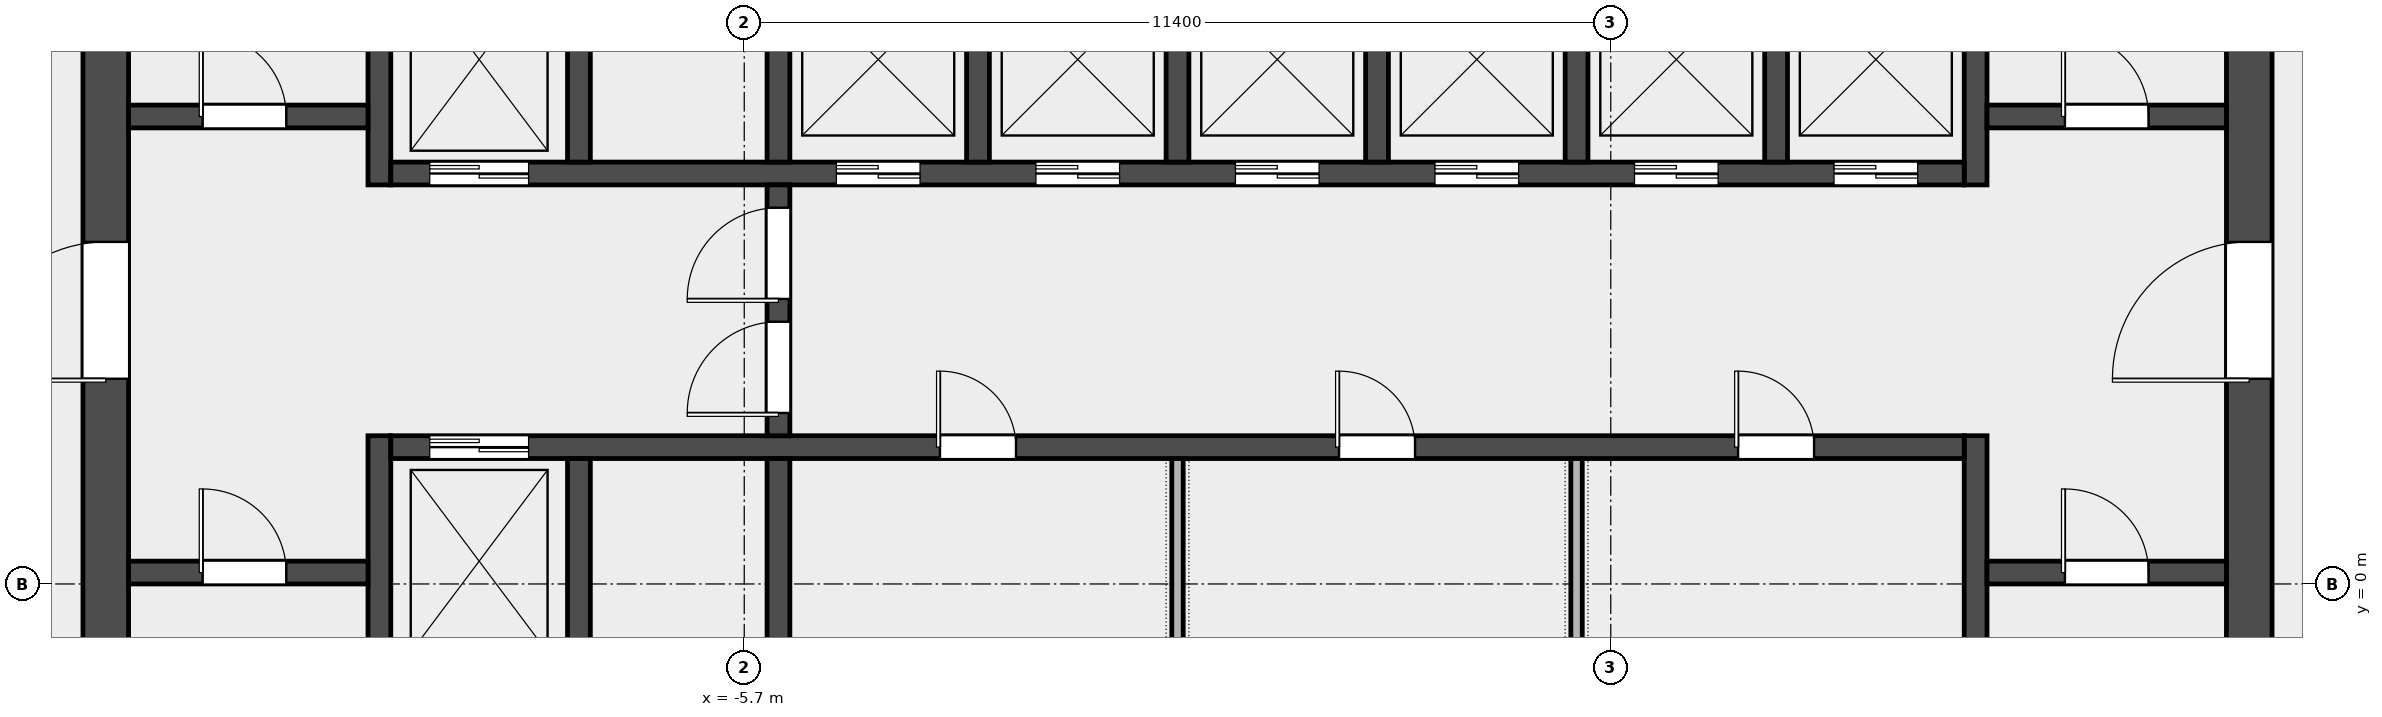
"""IFC4 building model, lengths in metres.
Left out: names, types, materials, properties, quantities, classifications, styles, units other than length and angle.
Written with IfcOpenShell. Run it as: python <this file> out.ifc"""

import sys

from ifc_helpers import new_model, si_unit, direction, frame, frame_2d, origin, place, context, subcontext, project, spatial, rectangle, extrude, element, fill, save


model = new_model("IFC4")
c1 = context("Model", 3, precision=1e-05, world=origin(), true_north=direction((0.0, 1.0)))
c2 = subcontext(c1, "Body", "Model", "MODEL_VIEW")
j1 = project(units=[si_unit("LENGTHUNIT", "METRE"), si_unit("PLANEANGLEUNIT", "RADIAN")], contexts=[c1])
p1 = place(None, origin())
s1 = spatial("IfcSite", under=j1, at=p1, CompositionType="ELEMENT")
p2 = place(p1, origin())
s2 = spatial("IfcBuilding", under=s1, at=p2, CompositionType="ELEMENT")
p3 = place(p2, frame((0.0, 0.0, 267.4)))
s3 = spatial("IfcBuildingStorey", under=s2, at=p3, CompositionType="ELEMENT", Elevation=267.4)
p4 = place(p3, frame((-14.1, -6.6, 0.0), z_axis=(0.0, 0.0, 1.0), x_axis=(0.0, 1.0, 0.0)))
e1 = element("IfcWall", 1, at=p4, inside=s3, PredefinedType="SHEAR", context=c2, shape_type="SweptSolid", body=[
    extrude(rectangle(XDim=19.5, YDim=0.6, at=frame_2d((9.75, 0.0))), origin(), (0.0, 0.0, 1.0), 3.7),
])
p5 = place(p4, frame((9.3, 0.0, 0.0)))
e2 = element("IfcOpeningElement", 2, at=p5, cuts=e1, PredefinedType="OPENING", context=c2, shape_type="SweptSolid", body=[
    extrude(rectangle(XDim=1.8, YDim=2.1, at=frame_2d((0.9, 1.05))), frame((0.0, 0.312, 0.0), z_axis=(0.0, -1.0, 0.0), x_axis=(1.0, 0.0, 0.0)), (0.0, 0.0, 1.0), 0.624),
])
p6 = place(p3, frame((14.1, -6.6, 0.0), z_axis=(0.0, 0.0, 1.0), x_axis=(0.0, 1.0, 0.0)))
e3 = element("IfcWall", 3, at=p6, inside=s3, PredefinedType="SHEAR", context=c2, shape_type="SweptSolid", body=[
    extrude(rectangle(XDim=19.5, YDim=0.6, at=frame_2d((9.75, 0.0))), origin(), (0.0, 0.0, 1.0), 3.7),
])
p7 = place(p6, frame((9.3, 0.0, 0.0)))
e4 = element("IfcOpeningElement", 4, at=p7, cuts=e3, PredefinedType="OPENING", context=c2, shape_type="SweptSolid", body=[
    extrude(rectangle(XDim=1.8, YDim=2.1, at=frame_2d((0.9, 1.05))), frame((0.0, 0.312, 0.0), z_axis=(0.0, -1.0, 0.0), x_axis=(1.0, 0.0, 0.0)), (0.0, 0.0, 1.0), 0.624),
])
p8 = place(p3, frame((-10.5, -6.6, 0.0), z_axis=(0.0, 0.0, 1.0), x_axis=(0.0, 1.0, 0.0)))
e5 = element("IfcWall", 5, at=p8, inside=s3, PredefinedType="SHEAR", context=c2, shape_type="SweptSolid", body=[
    extrude(rectangle(XDim=8.55, YDim=0.3, at=frame_2d((4.275, 0.0))), origin(), (0.0, 0.0, 1.0), 3.7),
])
p9 = place(p3, frame((-10.5, 5.25, 0.0), z_axis=(0.0, 0.0, 1.0), x_axis=(0.0, 1.0, 0.0)))
e6 = element("IfcWall", 6, at=p9, inside=s3, PredefinedType="SHEAR", context=c2, shape_type="SweptSolid", body=[
    extrude(rectangle(XDim=7.65, YDim=0.3, at=frame_2d((3.825, 0.0))), origin(), (0.0, 0.0, 1.0), 3.7),
])
p10 = place(p3, frame((10.5, -6.6, 0.0), z_axis=(0.0, 0.0, 1.0), x_axis=(0.0, 1.0, 0.0)))
e7 = element("IfcWall", 7, at=p10, inside=s3, PredefinedType="SHEAR", context=c2, shape_type="SweptSolid", body=[
    extrude(rectangle(XDim=8.55, YDim=0.3, at=frame_2d((4.275, 0.0))), origin(), (0.0, 0.0, 1.0), 3.7),
])
p11 = place(p3, frame((10.5, 5.25, 0.0), z_axis=(0.0, 0.0, 1.0), x_axis=(0.0, 1.0, 0.0)))
e8 = element("IfcWall", 8, at=p11, inside=s3, PredefinedType="SHEAR", context=c2, shape_type="SweptSolid", body=[
    extrude(rectangle(XDim=7.65, YDim=0.3, at=frame_2d((3.825, 0.0))), origin(), (0.0, 0.0, 1.0), 3.7),
])
p12 = place(p3, frame((-13.8, 0.15, 0.0), z_axis=(0.0, 0.0, 1.0), x_axis=(1.0, 0.0, 0.0)))
e9 = element("IfcWall", 9, at=p12, inside=s3, PredefinedType="SOLIDWALL", context=c2, shape_type="SweptSolid", body=[
    extrude(rectangle(XDim=3.15, YDim=0.3, at=frame_2d((1.575, 0.0))), origin(), (0.0, 0.0, 1.0), 3.7),
])
p13 = place(p12, frame((0.975, 0.0, 0.0)))
e10 = element("IfcOpeningElement", 10, at=p13, cuts=e9, PredefinedType="OPENING", context=c2, shape_type="SweptSolid", body=[
    extrude(rectangle(XDim=1.1, YDim=2.1, at=frame_2d((0.55, 1.05))), frame((0.0, 0.162, 0.0), z_axis=(0.0, -1.0, 0.0), x_axis=(1.0, 0.0, 0.0)), (0.0, 0.0, 1.0), 0.324),
])
p14 = place(p3, frame((-13.8, 6.15, 0.0), z_axis=(0.0, 0.0, 1.0), x_axis=(1.0, 0.0, 0.0)))
e11 = element("IfcWall", 11, at=p14, inside=s3, PredefinedType="SOLIDWALL", context=c2, shape_type="SweptSolid", body=[
    extrude(rectangle(XDim=3.15, YDim=0.3, at=frame_2d((1.575, 0.0))), origin(), (0.0, 0.0, 1.0), 3.7),
])
p15 = place(p14, frame((0.975, 0.0, 0.0)))
e12 = element("IfcOpeningElement", 12, at=p15, cuts=e11, PredefinedType="OPENING", context=c2, shape_type="SweptSolid", body=[
    extrude(rectangle(XDim=1.1, YDim=2.1, at=frame_2d((0.55, 1.05))), frame((0.0, 0.162, 0.0), z_axis=(0.0, -1.0, 0.0), x_axis=(1.0, 0.0, 0.0)), (0.0, 0.0, 1.0), 0.324),
])
p16 = place(p3, frame((10.65, 0.15, 0.0), z_axis=(0.0, 0.0, 1.0), x_axis=(1.0, 0.0, 0.0)))
e13 = element("IfcWall", 13, at=p16, inside=s3, PredefinedType="SOLIDWALL", context=c2, shape_type="SweptSolid", body=[
    extrude(rectangle(XDim=3.15, YDim=0.3, at=frame_2d((1.575, 0.0))), origin(), (0.0, 0.0, 1.0), 3.7),
])
p17 = place(p16, frame((1.025, 0.0, 0.0)))
e14 = element("IfcOpeningElement", 14, at=p17, cuts=e13, PredefinedType="OPENING", context=c2, shape_type="SweptSolid", body=[
    extrude(rectangle(XDim=1.1, YDim=2.1, at=frame_2d((0.55, 1.05))), frame((0.0, 0.162, 0.0), z_axis=(0.0, -1.0, 0.0), x_axis=(1.0, 0.0, 0.0)), (0.0, 0.0, 1.0), 0.324),
])
p18 = place(p3, frame((10.65, 6.15, 0.0), z_axis=(0.0, 0.0, 1.0), x_axis=(1.0, 0.0, 0.0)))
e15 = element("IfcWall", 15, at=p18, inside=s3, PredefinedType="SOLIDWALL", context=c2, shape_type="SweptSolid", body=[
    extrude(rectangle(XDim=3.15, YDim=0.3, at=frame_2d((1.575, 0.0))), origin(), (0.0, 0.0, 1.0), 3.7),
])
p19 = place(p18, frame((1.025, 0.0, 0.0)))
e16 = element("IfcOpeningElement", 16, at=p19, cuts=e15, PredefinedType="OPENING", context=c2, shape_type="SweptSolid", body=[
    extrude(rectangle(XDim=1.1, YDim=2.1, at=frame_2d((0.55, 1.05))), frame((0.0, 0.162, 0.0), z_axis=(0.0, -1.0, 0.0), x_axis=(1.0, 0.0, 0.0)), (0.0, 0.0, 1.0), 0.324),
])
p20 = place(p3, frame((-10.35, 1.8, 0.0), z_axis=(0.0, 0.0, 1.0), x_axis=(1.0, 0.0, 0.0)))
e17 = element("IfcWall", 17, at=p20, inside=s3, PredefinedType="SOLIDWALL", context=c2, shape_type="SweptSolid", body=[
    extrude(rectangle(XDim=20.7, YDim=0.3, at=frame_2d((10.35, 0.0))), origin(), (0.0, 0.0, 1.0), 3.7),
])
p21 = place(p20, frame((0.512, 0.0, 0.0)))
e18 = element("IfcOpeningElement", 18, at=p21, cuts=e17, PredefinedType="OPENING", context=c2, shape_type="SweptSolid", body=[
    extrude(rectangle(XDim=1.3, YDim=2.1, at=frame_2d((0.65, 1.05))), frame((0.0, 0.162, 0.0), z_axis=(0.0, -1.0, 0.0), x_axis=(1.0, 0.0, 0.0)), (0.0, 0.0, 1.0), 0.324),
])
p22 = place(p20, frame((7.225, 0.0, 0.0)))
e19 = element("IfcOpeningElement", 19, at=p22, cuts=e17, PredefinedType="OPENING", context=c2, shape_type="SweptSolid", body=[
    extrude(rectangle(XDim=1.0, YDim=2.1, at=frame_2d((0.5, 1.05))), frame((0.0, 0.162, 0.0), z_axis=(0.0, -1.0, 0.0), x_axis=(1.0, 0.0, 0.0)), (0.0, 0.0, 1.0), 0.324),
])
p23 = place(p20, frame((12.475, 0.0, 0.0)))
e20 = element("IfcOpeningElement", 20, at=p23, cuts=e17, PredefinedType="OPENING", context=c2, shape_type="SweptSolid", body=[
    extrude(rectangle(XDim=1.0, YDim=2.1, at=frame_2d((0.5, 1.05))), frame((0.0, 0.162, 0.0), z_axis=(0.0, -1.0, 0.0), x_axis=(1.0, 0.0, 0.0)), (0.0, 0.0, 1.0), 0.324),
])
p24 = place(p20, frame((17.725, 0.0, 0.0)))
e21 = element("IfcOpeningElement", 21, at=p24, cuts=e17, PredefinedType="OPENING", context=c2, shape_type="SweptSolid", body=[
    extrude(rectangle(XDim=1.0, YDim=2.1, at=frame_2d((0.5, 1.05))), frame((0.0, 0.162, 0.0), z_axis=(0.0, -1.0, 0.0), x_axis=(1.0, 0.0, 0.0)), (0.0, 0.0, 1.0), 0.324),
])
p25 = place(p3, frame((-10.35, 5.4, 0.0), z_axis=(0.0, 0.0, 1.0), x_axis=(1.0, 0.0, 0.0)))
e22 = element("IfcWall", 22, at=p25, inside=s3, PredefinedType="SOLIDWALL", context=c2, shape_type="SweptSolid", body=[
    extrude(rectangle(XDim=20.7, YDim=0.3, at=frame_2d((10.35, 0.0))), origin(), (0.0, 0.0, 1.0), 3.7),
])
p26 = place(p25, frame((0.512, 0.0, 0.0)))
e23 = element("IfcOpeningElement", 23, at=p26, cuts=e22, PredefinedType="OPENING", context=c2, shape_type="SweptSolid", body=[
    extrude(rectangle(XDim=1.3, YDim=2.1, at=frame_2d((0.65, 1.05))), frame((0.0, 0.162, 0.0), z_axis=(0.0, -1.0, 0.0), x_axis=(1.0, 0.0, 0.0)), (0.0, 0.0, 1.0), 0.324),
])
p27 = place(p25, frame((5.863, 0.0, 0.0)))
e24 = element("IfcOpeningElement", 24, at=p27, cuts=e22, PredefinedType="OPENING", context=c2, shape_type="SweptSolid", body=[
    extrude(rectangle(XDim=1.1, YDim=2.1, at=frame_2d((0.55, 1.05))), frame((0.0, 0.162, 0.0), z_axis=(0.0, -1.0, 0.0), x_axis=(1.0, 0.0, 0.0)), (0.0, 0.0, 1.0), 0.324),
])
p28 = place(p25, frame((8.488, 0.0, 0.0)))
e25 = element("IfcOpeningElement", 25, at=p28, cuts=e22, PredefinedType="OPENING", context=c2, shape_type="SweptSolid", body=[
    extrude(rectangle(XDim=1.1, YDim=2.1, at=frame_2d((0.55, 1.05))), frame((0.0, 0.162, 0.0), z_axis=(0.0, -1.0, 0.0), x_axis=(1.0, 0.0, 0.0)), (0.0, 0.0, 1.0), 0.324),
])
p29 = place(p25, frame((11.113, 0.0, 0.0)))
e26 = element("IfcOpeningElement", 26, at=p29, cuts=e22, PredefinedType="OPENING", context=c2, shape_type="SweptSolid", body=[
    extrude(rectangle(XDim=1.1, YDim=2.1, at=frame_2d((0.55, 1.05))), frame((0.0, 0.162, 0.0), z_axis=(0.0, -1.0, 0.0), x_axis=(1.0, 0.0, 0.0)), (0.0, 0.0, 1.0), 0.324),
])
p30 = place(p25, frame((13.738, 0.0, 0.0)))
e27 = element("IfcOpeningElement", 27, at=p30, cuts=e22, PredefinedType="OPENING", context=c2, shape_type="SweptSolid", body=[
    extrude(rectangle(XDim=1.1, YDim=2.1, at=frame_2d((0.55, 1.05))), frame((0.0, 0.162, 0.0), z_axis=(0.0, -1.0, 0.0), x_axis=(1.0, 0.0, 0.0)), (0.0, 0.0, 1.0), 0.324),
])
p31 = place(p25, frame((16.363, 0.0, 0.0)))
e28 = element("IfcOpeningElement", 28, at=p31, cuts=e22, PredefinedType="OPENING", context=c2, shape_type="SweptSolid", body=[
    extrude(rectangle(XDim=1.1, YDim=2.1, at=frame_2d((0.55, 1.05))), frame((0.0, 0.162, 0.0), z_axis=(0.0, -1.0, 0.0), x_axis=(1.0, 0.0, 0.0)), (0.0, 0.0, 1.0), 0.324),
])
p32 = place(p25, frame((18.988, 0.0, 0.0)))
e29 = element("IfcOpeningElement", 29, at=p32, cuts=e22, PredefinedType="OPENING", context=c2, shape_type="SweptSolid", body=[
    extrude(rectangle(XDim=1.1, YDim=2.1, at=frame_2d((0.55, 1.05))), frame((0.0, 0.162, 0.0), z_axis=(0.0, -1.0, 0.0), x_axis=(1.0, 0.0, 0.0)), (0.0, 0.0, 1.0), 0.324),
])
for number, where, z_axis, x_axis in (
    (30, (-7.875, -1.05, 0.0), (0.0, 0.0, 1.0), (0.0, 1.0, 0.0)),
    (31, (-5.25, -1.05, 0.0), (0.0, 0.0, 1.0), (0.0, 1.0, 0.0)),
    (32, (-7.875, 5.55, 0.0), (0.0, 0.0, 1.0), (0.0, 1.0, 0.0)),
    (33, (-5.25, 5.55, 0.0), (0.0, 0.0, 1.0), (0.0, 1.0, 0.0)),
    (34, (-2.625, 5.55, 0.0), (0.0, 0.0, 1.0), (0.0, 1.0, 0.0)),
    (35, (0.0, 5.55, 0.0), (0.0, 0.0, 1.0), (0.0, 1.0, 0.0)),
    (36, (2.625, 5.55, 0.0), (0.0, 0.0, 1.0), (0.0, 1.0, 0.0)),
    (37, (5.25, 5.55, 0.0), (0.0, 0.0, 1.0), (0.0, 1.0, 0.0)),
    (38, (7.875, 5.55, 0.0), (0.0, 0.0, 1.0), (0.0, 1.0, 0.0)),
):
    element("IfcWall", number, at=place(p3, frame(where, z_axis=z_axis, x_axis=x_axis)), inside=s3, PredefinedType="SOLIDWALL", context=c2, shape_type="SweptSolid", body=[
        extrude(rectangle(XDim=2.7, YDim=0.3, at=frame_2d((1.35, 0.0))), origin(), (0.0, 0.0, 1.0), 3.7),
    ])
p33 = place(p3, frame((-5.25, 1.95, 0.0), z_axis=(0.0, 0.0, 1.0), x_axis=(0.0, 1.0, 0.0)))
e39 = element("IfcWall", 39, at=p33, inside=s3, PredefinedType="SOLIDWALL", context=c2, shape_type="SweptSolid", body=[
    extrude(rectangle(XDim=3.3, YDim=0.3, at=frame_2d((1.65, 0.0))), origin(), (0.0, 0.0, 1.0), 3.7),
])
p34 = place(p33, frame((0.3, 0.0, 0.0)))
e40 = element("IfcOpeningElement", 40, at=p34, cuts=e39, PredefinedType="OPENING", context=c2, shape_type="SweptSolid", body=[
    extrude(rectangle(XDim=1.2, YDim=2.1, at=frame_2d((0.6, 1.05))), frame((0.0, 0.162, 0.0), z_axis=(0.0, -1.0, 0.0), x_axis=(1.0, 0.0, 0.0)), (0.0, 0.0, 1.0), 0.324),
])
p35 = place(p33, frame((1.8, 0.0, 0.0)))
e41 = element("IfcOpeningElement", 41, at=p35, cuts=e39, PredefinedType="OPENING", context=c2, shape_type="SweptSolid", body=[
    extrude(rectangle(XDim=1.2, YDim=2.1, at=frame_2d((0.6, 1.05))), frame((0.0, 0.162, 0.0), z_axis=(0.0, -1.0, 0.0), x_axis=(1.0, 0.0, 0.0)), (0.0, 0.0, 1.0), 0.324),
])
for number, where, z_axis, x_axis in (
    (42, (0.0, -1.05, 0.0), (0.0, 0.0, 1.0), (0.0, 1.0, 0.0)),
    (43, (5.25, -1.05, 0.0), (0.0, 0.0, 1.0), (0.0, 1.0, 0.0)),
):
    element("IfcWall", number, at=place(p3, frame(where, z_axis=z_axis, x_axis=x_axis)), inside=s3, PredefinedType="PARTITIONING", context=c2, shape_type="SweptSolid", body=[
        extrude(rectangle(XDim=2.7, YDim=0.15, at=frame_2d((1.35, 0.0))), origin(), (0.0, 0.0, 1.0), 3.7),
    ])
p36 = place(p13, origin())
e44 = element("IfcDoor", 44, at=p36, inside=s3, OperationType="SINGLE_SWING_LEFT", PredefinedType="DOOR", context=c2, shape_type="SweptSolid", body=[
    extrude(rectangle(XDim=1.1, YDim=2.1, at=frame_2d((0.55, 1.05))), frame((0.0, 0.025, 0.0), z_axis=(0.0, -1.0, 0.0), x_axis=(1.0, 0.0, 0.0)), (0.0, 0.0, 1.0), 0.05),
])
fill(e10, e44)
p37 = place(p15, origin())
e45 = element("IfcDoor", 45, at=p37, inside=s3, OperationType="SINGLE_SWING_LEFT", PredefinedType="DOOR", context=c2, shape_type="SweptSolid", body=[
    extrude(rectangle(XDim=1.1, YDim=2.1, at=frame_2d((0.55, 1.05))), frame((0.0, 0.025, 0.0), z_axis=(0.0, -1.0, 0.0), x_axis=(1.0, 0.0, 0.0)), (0.0, 0.0, 1.0), 0.05),
])
fill(e12, e45)
p38 = place(p17, origin())
e46 = element("IfcDoor", 46, at=p38, inside=s3, OperationType="SINGLE_SWING_RIGHT", PredefinedType="DOOR", context=c2, shape_type="SweptSolid", body=[
    extrude(rectangle(XDim=1.1, YDim=2.1, at=frame_2d((0.55, 1.05))), frame((0.0, 0.025, 0.0), z_axis=(0.0, -1.0, 0.0), x_axis=(1.0, 0.0, 0.0)), (0.0, 0.0, 1.0), 0.05),
])
fill(e14, e46)
p39 = place(p19, origin())
e47 = element("IfcDoor", 47, at=p39, inside=s3, OperationType="SINGLE_SWING_RIGHT", PredefinedType="DOOR", context=c2, shape_type="SweptSolid", body=[
    extrude(rectangle(XDim=1.1, YDim=2.1, at=frame_2d((0.55, 1.05))), frame((0.0, 0.025, 0.0), z_axis=(0.0, -1.0, 0.0), x_axis=(1.0, 0.0, 0.0)), (0.0, 0.0, 1.0), 0.05),
])
fill(e16, e47)
p40 = place(p5, origin())
e48 = element("IfcDoor", 48, at=p40, inside=s3, OperationType="DOUBLE_DOOR_SINGLE_SWING", PredefinedType="DOOR", context=c2, shape_type="SweptSolid", body=[
    extrude(rectangle(XDim=1.8, YDim=2.1, at=frame_2d((0.9, 1.05))), frame((0.0, 0.025, 0.0), z_axis=(0.0, -1.0, 0.0), x_axis=(1.0, 0.0, 0.0)), (0.0, 0.0, 1.0), 0.05),
])
fill(e2, e48)
p41 = place(p7, origin())
e49 = element("IfcDoor", 49, at=p41, inside=s3, OperationType="DOUBLE_DOOR_SINGLE_SWING", PredefinedType="DOOR", context=c2, shape_type="SweptSolid", body=[
    extrude(rectangle(XDim=1.8, YDim=2.1, at=frame_2d((0.9, 1.05))), frame((0.0, 0.025, 0.0), z_axis=(0.0, -1.0, 0.0), x_axis=(1.0, 0.0, 0.0)), (0.0, 0.0, 1.0), 0.05),
])
fill(e4, e49)
p42 = place(p34, origin())
e50 = element("IfcDoor", 50, at=p42, inside=s3, OperationType="SINGLE_SWING_LEFT", PredefinedType="DOOR", context=c2, shape_type="SweptSolid", body=[
    extrude(rectangle(XDim=1.2, YDim=2.1, at=frame_2d((0.6, 1.05))), frame((0.0, 0.025, 0.0), z_axis=(0.0, -1.0, 0.0), x_axis=(1.0, 0.0, 0.0)), (0.0, 0.0, 1.0), 0.05),
])
fill(e40, e50)
p43 = place(p35, origin())
e51 = element("IfcDoor", 51, at=p43, inside=s3, OperationType="SINGLE_SWING_RIGHT", PredefinedType="DOOR", context=c2, shape_type="SweptSolid", body=[
    extrude(rectangle(XDim=1.2, YDim=2.1, at=frame_2d((0.6, 1.05))), frame((0.0, 0.025, 0.0), z_axis=(0.0, -1.0, 0.0), x_axis=(1.0, 0.0, 0.0)), (0.0, 0.0, 1.0), 0.05),
])
fill(e41, e51)
p44 = place(p21, origin())
e52 = element("IfcDoor", 52, at=p44, inside=s3, OperationType="DOUBLE_DOOR_SLIDING", PredefinedType="DOOR", context=c2, shape_type="SweptSolid", body=[
    extrude(rectangle(XDim=1.3, YDim=2.1, at=frame_2d((0.65, 1.05))), frame((0.0, 0.025, 0.0), z_axis=(0.0, -1.0, 0.0), x_axis=(1.0, 0.0, 0.0)), (0.0, 0.0, 1.0), 0.05),
])
fill(e18, e52)
p45 = place(p26, origin())
e53 = element("IfcDoor", 53, at=p45, inside=s3, OperationType="DOUBLE_DOOR_SLIDING", PredefinedType="DOOR", context=c2, shape_type="SweptSolid", body=[
    extrude(rectangle(XDim=1.3, YDim=2.1, at=frame_2d((0.65, 1.05))), frame((0.0, 0.025, 0.0), z_axis=(0.0, -1.0, 0.0), x_axis=(1.0, 0.0, 0.0)), (0.0, 0.0, 1.0), 0.05),
])
fill(e23, e53)
p46 = place(p27, origin())
e54 = element("IfcDoor", 54, at=p46, inside=s3, OperationType="DOUBLE_DOOR_SLIDING", PredefinedType="DOOR", context=c2, shape_type="SweptSolid", body=[
    extrude(rectangle(XDim=1.1, YDim=2.1, at=frame_2d((0.55, 1.05))), frame((0.0, 0.025, 0.0), z_axis=(0.0, -1.0, 0.0), x_axis=(1.0, 0.0, 0.0)), (0.0, 0.0, 1.0), 0.05),
])
fill(e24, e54)
p47 = place(p28, origin())
e55 = element("IfcDoor", 55, at=p47, inside=s3, OperationType="DOUBLE_DOOR_SLIDING", PredefinedType="DOOR", context=c2, shape_type="SweptSolid", body=[
    extrude(rectangle(XDim=1.1, YDim=2.1, at=frame_2d((0.55, 1.05))), frame((0.0, 0.025, 0.0), z_axis=(0.0, -1.0, 0.0), x_axis=(1.0, 0.0, 0.0)), (0.0, 0.0, 1.0), 0.05),
])
fill(e25, e55)
p48 = place(p29, origin())
e56 = element("IfcDoor", 56, at=p48, inside=s3, OperationType="DOUBLE_DOOR_SLIDING", PredefinedType="DOOR", context=c2, shape_type="SweptSolid", body=[
    extrude(rectangle(XDim=1.1, YDim=2.1, at=frame_2d((0.55, 1.05))), frame((0.0, 0.025, 0.0), z_axis=(0.0, -1.0, 0.0), x_axis=(1.0, 0.0, 0.0)), (0.0, 0.0, 1.0), 0.05),
])
fill(e26, e56)
p49 = place(p30, origin())
e57 = element("IfcDoor", 57, at=p49, inside=s3, OperationType="DOUBLE_DOOR_SLIDING", PredefinedType="DOOR", context=c2, shape_type="SweptSolid", body=[
    extrude(rectangle(XDim=1.1, YDim=2.1, at=frame_2d((0.55, 1.05))), frame((0.0, 0.025, 0.0), z_axis=(0.0, -1.0, 0.0), x_axis=(1.0, 0.0, 0.0)), (0.0, 0.0, 1.0), 0.05),
])
fill(e27, e57)
p50 = place(p31, origin())
e58 = element("IfcDoor", 58, at=p50, inside=s3, OperationType="DOUBLE_DOOR_SLIDING", PredefinedType="DOOR", context=c2, shape_type="SweptSolid", body=[
    extrude(rectangle(XDim=1.1, YDim=2.1, at=frame_2d((0.55, 1.05))), frame((0.0, 0.025, 0.0), z_axis=(0.0, -1.0, 0.0), x_axis=(1.0, 0.0, 0.0)), (0.0, 0.0, 1.0), 0.05),
])
fill(e28, e58)
p51 = place(p32, origin())
e59 = element("IfcDoor", 59, at=p51, inside=s3, OperationType="DOUBLE_DOOR_SLIDING", PredefinedType="DOOR", context=c2, shape_type="SweptSolid", body=[
    extrude(rectangle(XDim=1.1, YDim=2.1, at=frame_2d((0.55, 1.05))), frame((0.0, 0.025, 0.0), z_axis=(0.0, -1.0, 0.0), x_axis=(1.0, 0.0, 0.0)), (0.0, 0.0, 1.0), 0.05),
])
fill(e29, e59)
p52 = place(p22, origin())
e60 = element("IfcDoor", 60, at=p52, inside=s3, OperationType="SINGLE_SWING_LEFT", PredefinedType="DOOR", context=c2, shape_type="SweptSolid", body=[
    extrude(rectangle(XDim=1.0, YDim=2.1, at=frame_2d((0.5, 1.05))), frame((0.0, 0.025, 0.0), z_axis=(0.0, -1.0, 0.0), x_axis=(1.0, 0.0, 0.0)), (0.0, 0.0, 1.0), 0.05),
])
fill(e19, e60)
p53 = place(p23, origin())
e61 = element("IfcDoor", 61, at=p53, inside=s3, OperationType="SINGLE_SWING_LEFT", PredefinedType="DOOR", context=c2, shape_type="SweptSolid", body=[
    extrude(rectangle(XDim=1.0, YDim=2.1, at=frame_2d((0.5, 1.05))), frame((0.0, 0.025, 0.0), z_axis=(0.0, -1.0, 0.0), x_axis=(1.0, 0.0, 0.0)), (0.0, 0.0, 1.0), 0.05),
])
fill(e20, e61)
p54 = place(p24, origin())
e62 = element("IfcDoor", 62, at=p54, inside=s3, OperationType="SINGLE_SWING_LEFT", PredefinedType="DOOR", context=c2, shape_type="SweptSolid", body=[
    extrude(rectangle(XDim=1.0, YDim=2.1, at=frame_2d((0.5, 1.05))), frame((0.0, 0.025, 0.0), z_axis=(0.0, -1.0, 0.0), x_axis=(1.0, 0.0, 0.0)), (0.0, 0.0, 1.0), 0.05),
])
fill(e21, e62)
save(model, sys.argv[1])
